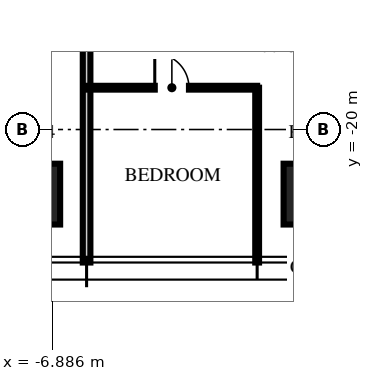
"""IFC4 building model, lengths in metres.
Left out: names, types, materials, properties, quantities, classifications, styles, units other than length and angle.
Written with IfcOpenShell. Run it as: python <this file> out.ifc"""

import sys

from ifc_helpers import new_model, si_unit, direction, frame, frame_2d, origin, origin_2d, place, context, subcontext, project, spatial, rectangle, extrude, element, fill, save


model = new_model("IFC4")
c1 = context("Model", 3, precision=1e-05, world=origin(), true_north=direction((0.0, 1.0)))
c2 = subcontext(c1, "Body", "Model", "MODEL_VIEW")
j1 = project(units=[si_unit("LENGTHUNIT", "METRE"), si_unit("PLANEANGLEUNIT", "RADIAN")], contexts=[c1])
p1 = place(None, origin())
s1 = spatial("IfcSite", under=j1, at=p1, CompositionType="ELEMENT")
p2 = place(p1, origin())
s2 = spatial("IfcBuilding", under=s1, at=p2, CompositionType="ELEMENT")
p3 = place(p2, frame((0.0, 0.0, 308.25)))
s3 = spatial("IfcBuildingStorey", under=s2, at=p3, CompositionType="ELEMENT", Elevation=308.25)
for number, where, z_axis, x_axis in (
    (1, (0.0, -21.7, 0.0), (0.0, 0.0, 1.0), (1.0, 0.0, 0.0)),
    (2, (-7.48, -21.7, 0.0), (0.0, 0.0, 1.0), (1.0, 0.0, 0.0)),
):
    element("IfcColumn", number, at=place(p3, frame(where, z_axis=z_axis, x_axis=x_axis)), inside=s3, PredefinedType="COLUMN", context=c2, shape_type="SweptSolid", body=[
        extrude(rectangle(XDim=1.6, YDim=1.6, at=origin_2d()), origin(), (0.0, 0.0, 1.0), 3.75),
    ])
p4 = place(p3, frame((-5.984, -12.65, 0.0), z_axis=(0.0, 0.0, 1.0), x_axis=(0.0, -1.0, 0.0)))
e3 = element("IfcWall", 3, at=p4, inside=s3, PredefinedType="PARTITIONING", context=c2, shape_type="SweptSolid", body=[
    extrude(rectangle(XDim=10.85, YDim=0.2, at=frame_2d((5.425, 0.0))), origin(), (0.0, 0.0, 1.0), 3.01),
])
p5 = place(p3, frame((-1.496, -18.9, 0.0), z_axis=(0.0, 0.0, 1.0), x_axis=(0.0, -1.0, 0.0)))
e4 = element("IfcWall", 4, at=p5, inside=s3, PredefinedType="PARTITIONING", context=c2, shape_type="SweptSolid", body=[
    extrude(rectangle(XDim=4.6, YDim=0.1, at=frame_2d((2.3, 0.0))), origin(), (0.0, 0.0, 1.0), 3.01),
])
p6 = place(p3, frame((-5.984, -18.9, 0.0), z_axis=(0.0, 0.0, 1.0), x_axis=(1.0, 0.0, 0.0)))
e5 = element("IfcWall", 5, at=p6, inside=s3, PredefinedType="PARTITIONING", context=c2, shape_type="SweptSolid", body=[
    extrude(rectangle(XDim=4.488, YDim=0.1, at=frame_2d((2.244, 0.0))), origin(), (0.0, 0.0, 1.0), 2.91),
])
p7 = place(p6, frame((1.794, 0.0, 0.0)))
e6 = element("IfcOpeningElement", 6, at=p7, cuts=e5, PredefinedType="OPENING", context=c2, shape_type="SweptSolid", body=[
    extrude(rectangle(XDim=0.9, YDim=2.1, at=frame_2d((0.45, 1.05))), frame((0.0, 0.06, 0.0), z_axis=(0.0, -1.0, 0.0), x_axis=(1.0, 0.0, 0.0)), (0.0, 0.0, 1.0), 0.12),
])
p8 = place(p7, origin())
e7 = element("IfcDoor", 7, at=p8, inside=s3, OperationType="SINGLE_SWING_LEFT", PredefinedType="DOOR", context=c2, shape_type="SweptSolid", body=[
    extrude(rectangle(XDim=0.9, YDim=2.1, at=frame_2d((0.45, 1.05))), frame((0.0, 0.025, 0.0), z_axis=(0.0, -1.0, 0.0), x_axis=(1.0, 0.0, 0.0)), (0.0, 0.0, 1.0), 0.05),
])
fill(e6, e7)
save(model, sys.argv[1])
